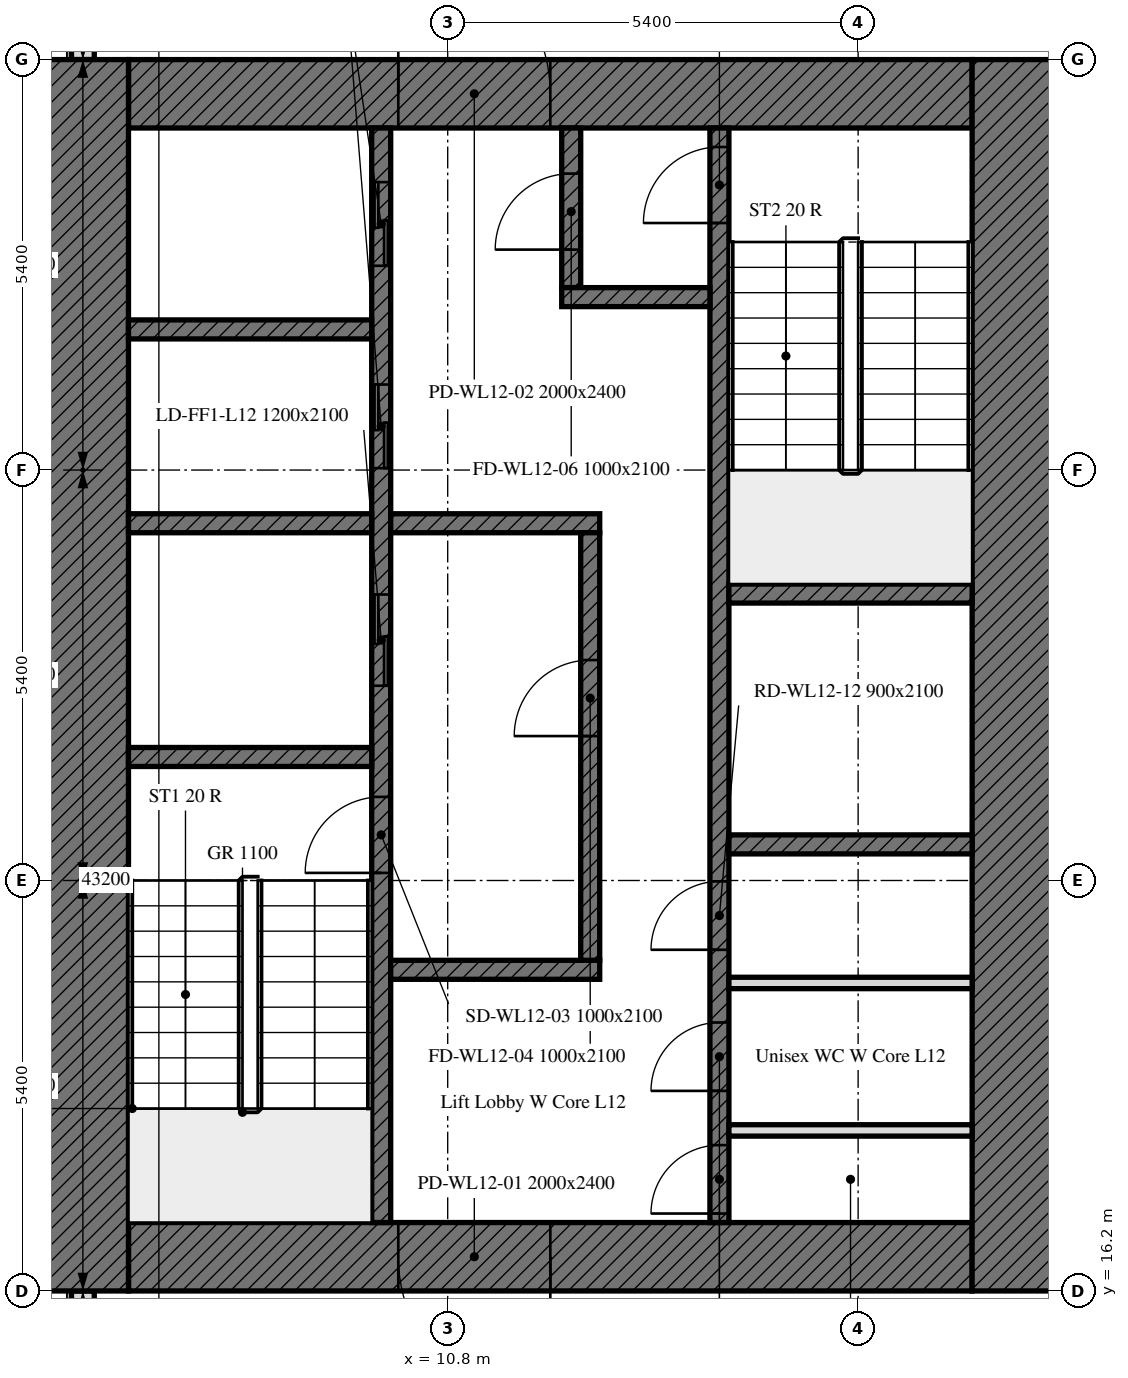
"""IFC4 building model, lengths in metres.
Left out: names, types, materials, properties, quantities, classifications, styles, units other than length and angle.
Written with IfcOpenShell. Run it as: python <this file> out.ifc"""

import sys

from ifc_helpers import new_model, si_unit, direction, frame, frame_2d, origin, place, context, subcontext, project, spatial, rectangle, extrude, element, fill, save


model = new_model("IFC4")
c1 = context("Model", 3, precision=1e-05, world=origin(), true_north=direction((0.0, 1.0)))
c2 = subcontext(c1, "Body", "Model", "MODEL_VIEW")
j1 = project(units=[si_unit("LENGTHUNIT", "METRE"), si_unit("PLANEANGLEUNIT", "RADIAN")], contexts=[c1])
p1 = place(None, origin())
s1 = spatial("IfcSite", under=j1, at=p1, CompositionType="ELEMENT")
p2 = place(p1, origin())
s2 = spatial("IfcBuilding", under=s1, at=p2, CompositionType="ELEMENT")
p3 = place(p2, frame((0.0, 0.0, 56.4)))
s3 = spatial("IfcBuildingStorey", under=s2, at=p3, CompositionType="ELEMENT", Elevation=56.4)
p4 = place(p3, frame((6.0, 37.614, 0.0), z_axis=(0.0, 0.0, 1.0), x_axis=(0.0, -1.0, 0.0)))
e1 = element("IfcWall", 1, at=p4, inside=s3, PredefinedType="SOLIDWALL", context=c2, shape_type="SweptSolid", body=[
    extrude(rectangle(XDim=5.214, YDim=0.3, at=frame_2d((2.607, 0.0))), origin(), (0.0, 0.0, 1.0), 3.3),
])
p5 = place(p4, frame((1.164, 0.0, 0.9)))
e2 = element("IfcOpeningElement", 2, at=p5, cuts=e1, PredefinedType="OPENING", context=c2, shape_type="SweptSolid", body=[
    extrude(rectangle(XDim=1.1, YDim=1.7, at=frame_2d((0.55, 0.85))), frame((0.0, 0.16, 0.0), z_axis=(0.0, -1.0, 0.0), x_axis=(1.0, 0.0, 0.0)), (0.0, 0.0, 1.0), 0.32),
])
p6 = place(p4, frame((2.764, 0.0, 0.9)))
e3 = element("IfcOpeningElement", 3, at=p6, cuts=e1, PredefinedType="OPENING", context=c2, shape_type="SweptSolid", body=[
    extrude(rectangle(XDim=1.1, YDim=1.7, at=frame_2d((0.55, 0.85))), frame((0.0, 0.16, 0.0), z_axis=(0.0, -1.0, 0.0), x_axis=(1.0, 0.0, 0.0)), (0.0, 0.0, 1.0), 0.32),
])
p7 = place(p3, frame((6.0, 16.2, 0.0), z_axis=(0.0, 0.0, 1.0), x_axis=(0.0, -1.0, 0.0)))
e4 = element("IfcWall", 4, at=p7, inside=s3, PredefinedType="SOLIDWALL", context=c2, shape_type="SweptSolid", body=[
    extrude(rectangle(XDim=10.614, YDim=0.3, at=frame_2d((5.307, 0.0))), origin(), (0.0, 0.0, 1.0), 3.3),
])
p8 = place(p7, frame((1.35, 0.0, 0.9)))
e5 = element("IfcOpeningElement", 5, at=p8, cuts=e4, PredefinedType="OPENING", context=c2, shape_type="SweptSolid", body=[
    extrude(rectangle(XDim=1.1, YDim=1.7, at=frame_2d((0.55, 0.85))), frame((0.0, 0.16, 0.0), z_axis=(0.0, -1.0, 0.0), x_axis=(1.0, 0.0, 0.0)), (0.0, 0.0, 1.0), 0.32),
])
p9 = place(p7, frame((2.95, 0.0, 0.9)))
e6 = element("IfcOpeningElement", 6, at=p9, cuts=e4, PredefinedType="OPENING", context=c2, shape_type="SweptSolid", body=[
    extrude(rectangle(XDim=1.1, YDim=1.7, at=frame_2d((0.55, 0.85))), frame((0.0, 0.16, 0.0), z_axis=(0.0, -1.0, 0.0), x_axis=(1.0, 0.0, 0.0)), (0.0, 0.0, 1.0), 0.32),
])
p10 = place(p3, frame((17.7, 16.65, 0.0), z_axis=(0.0, 0.0, 1.0), x_axis=(-1.0, 0.0, 0.0)))
e7 = element("IfcWall", 7, at=p10, inside=s3, PredefinedType="SOLIDWALL", context=c2, shape_type="SweptSolid", body=[
    extrude(rectangle(XDim=11.1, YDim=0.9, at=frame_2d((5.55, 0.0))), origin(), (0.0, 0.0, 1.0), 3.3),
])
p11 = place(p10, frame((5.55, 0.0, 0.0)))
e8 = element("IfcOpeningElement", 8, at=p11, cuts=e7, PredefinedType="OPENING", context=c2, shape_type="SweptSolid", body=[
    extrude(rectangle(XDim=2.0, YDim=2.4, at=frame_2d((1.0, 1.2))), frame((0.0, 0.45, 0.0), z_axis=(0.0, -1.0, 0.0), x_axis=(1.0, 0.0, 0.0)), (0.0, 0.0, 1.0), 0.9),
])
p12 = place(p3, frame((6.6, 31.95, 0.0), z_axis=(0.0, 0.0, 1.0), x_axis=(1.0, 0.0, 0.0)))
e9 = element("IfcWall", 9, at=p12, inside=s3, PredefinedType="SOLIDWALL", context=c2, shape_type="SweptSolid", body=[
    extrude(rectangle(XDim=11.1, YDim=0.9, at=frame_2d((5.55, 0.0))), origin(), (0.0, 0.0, 1.0), 3.3),
])
p13 = place(p12, frame((3.55, 0.0, 0.0)))
e10 = element("IfcOpeningElement", 10, at=p13, cuts=e9, PredefinedType="OPENING", context=c2, shape_type="SweptSolid", body=[
    extrude(rectangle(XDim=2.0, YDim=2.4, at=frame_2d((1.0, 1.2))), frame((0.0, 0.45, 0.0), z_axis=(0.0, -1.0, 0.0), x_axis=(1.0, 0.0, 0.0)), (0.0, 0.0, 1.0), 0.9),
])
for number, where, z_axis, x_axis in (
    (11, (6.0, 16.2, 0.0), (0.0, 0.0, 1.0), (0.0, 1.0, 0.0)),
    (12, (18.3, 32.4, 0.0), (0.0, 0.0, 1.0), (0.0, -1.0, 0.0)),
):
    element("IfcWall", number, at=place(p3, frame(where, z_axis=z_axis, x_axis=x_axis)), inside=s3, PredefinedType="SOLIDWALL", context=c2, shape_type="SweptSolid", body=[
        extrude(rectangle(XDim=16.2, YDim=1.2, at=frame_2d((8.1, 0.0))), origin(), (0.0, 0.0, 1.0), 3.3),
    ])
p14 = place(p3, frame((9.925, 17.1, 0.0), z_axis=(0.0, 0.0, 1.0), x_axis=(0.0, 1.0, 0.0)))
e13 = element("IfcWall", 13, at=p14, inside=s3, PredefinedType="SOLIDWALL", context=c2, shape_type="SweptSolid", body=[
    extrude(rectangle(XDim=14.4, YDim=0.25, at=frame_2d((7.2, 0.0))), origin(), (0.0, 0.0, 1.0), 3.3),
])
p15 = place(p14, frame((4.6, 0.0, 0.0)))
e14 = element("IfcOpeningElement", 14, at=p15, cuts=e13, PredefinedType="OPENING", context=c2, shape_type="SweptSolid", body=[
    extrude(rectangle(XDim=1.0, YDim=2.1, at=frame_2d((0.5, 1.05))), frame((0.0, 0.125, 0.0), z_axis=(0.0, -1.0, 0.0), x_axis=(1.0, 0.0, 0.0)), (0.0, 0.0, 1.0), 0.25),
])
p16 = place(p14, frame((7.062, 0.0, 0.0)))
e15 = element("IfcOpeningElement", 15, at=p16, cuts=e13, PredefinedType="OPENING", context=c2, shape_type="SweptSolid", body=[
    extrude(rectangle(XDim=1.2, YDim=2.1, at=frame_2d((0.6, 1.05))), frame((0.0, 0.125, 0.0), z_axis=(0.0, -1.0, 0.0), x_axis=(1.0, 0.0, 0.0)), (0.0, 0.0, 1.0), 0.25),
])
p17 = place(p14, frame((9.925, 0.0, 0.0)))
e16 = element("IfcOpeningElement", 16, at=p17, cuts=e13, PredefinedType="OPENING", context=c2, shape_type="SweptSolid", body=[
    extrude(rectangle(XDim=1.1, YDim=2.1, at=frame_2d((0.55, 1.05))), frame((0.0, 0.125, 0.0), z_axis=(0.0, -1.0, 0.0), x_axis=(1.0, 0.0, 0.0)), (0.0, 0.0, 1.0), 0.25),
])
p18 = place(p14, frame((12.587, 0.0, 0.0)))
e17 = element("IfcOpeningElement", 17, at=p18, cuts=e13, PredefinedType="OPENING", context=c2, shape_type="SweptSolid", body=[
    extrude(rectangle(XDim=1.1, YDim=2.1, at=frame_2d((0.55, 1.05))), frame((0.0, 0.125, 0.0), z_axis=(0.0, -1.0, 0.0), x_axis=(1.0, 0.0, 0.0)), (0.0, 0.0, 1.0), 0.25),
])
p19 = place(p3, frame((14.375, 17.1, 0.0), z_axis=(0.0, 0.0, 1.0), x_axis=(0.0, 1.0, 0.0)))
e18 = element("IfcWall", 18, at=p19, inside=s3, PredefinedType="SOLIDWALL", context=c2, shape_type="SweptSolid", body=[
    extrude(rectangle(XDim=14.4, YDim=0.25, at=frame_2d((7.2, 0.0))), origin(), (0.0, 0.0, 1.0), 3.3),
])
p20 = place(p19, frame((13.15, 0.0, 0.0)))
e19 = element("IfcOpeningElement", 19, at=p20, cuts=e18, PredefinedType="OPENING", context=c2, shape_type="SweptSolid", body=[
    extrude(rectangle(XDim=1.0, YDim=2.1, at=frame_2d((0.5, 1.05))), frame((0.0, 0.125, 0.0), z_axis=(0.0, -1.0, 0.0), x_axis=(1.0, 0.0, 0.0)), (0.0, 0.0, 1.0), 0.25),
])
p21 = place(p19, frame((0.118, 0.0, 0.0)))
e20 = element("IfcOpeningElement", 20, at=p21, cuts=e18, PredefinedType="OPENING", context=c2, shape_type="SweptSolid", body=[
    extrude(rectangle(XDim=0.9, YDim=2.1, at=frame_2d((0.45, 1.05))), frame((0.0, 0.125, 0.0), z_axis=(0.0, -1.0, 0.0), x_axis=(1.0, 0.0, 0.0)), (0.0, 0.0, 1.0), 0.25),
])
p22 = place(p19, frame((1.732, 0.0, 0.0)))
e21 = element("IfcOpeningElement", 21, at=p22, cuts=e18, PredefinedType="OPENING", context=c2, shape_type="SweptSolid", body=[
    extrude(rectangle(XDim=0.9, YDim=2.1, at=frame_2d((0.45, 1.05))), frame((0.0, 0.125, 0.0), z_axis=(0.0, -1.0, 0.0), x_axis=(1.0, 0.0, 0.0)), (0.0, 0.0, 1.0), 0.25),
])
p23 = place(p19, frame((3.588, 0.0, 0.0)))
e22 = element("IfcOpeningElement", 22, at=p23, cuts=e18, PredefinedType="OPENING", context=c2, shape_type="SweptSolid", body=[
    extrude(rectangle(XDim=0.9, YDim=2.1, at=frame_2d((0.45, 1.05))), frame((0.0, 0.125, 0.0), z_axis=(0.0, -1.0, 0.0), x_axis=(1.0, 0.0, 0.0)), (0.0, 0.0, 1.0), 0.25),
])
for number, where, z_axis, x_axis in (
    (23, (6.6, 23.225, 0.0), (0.0, 0.0, 1.0), (1.0, 0.0, 0.0)),
    (24, (14.5, 25.375, 0.0), (0.0, 0.0, 1.0), (1.0, 0.0, 0.0)),
    (25, (14.5, 22.075, 0.0), (0.0, 0.0, 1.0), (1.0, 0.0, 0.0)),
    (26, (6.6, 26.3, 0.0), (0.0, 0.0, 1.0), (1.0, 0.0, 0.0)),
):
    element("IfcWall", number, at=place(p3, frame(where, z_axis=z_axis, x_axis=x_axis)), inside=s3, PredefinedType="SOLIDWALL", context=c2, shape_type="SweptSolid", body=[
        extrude(rectangle(XDim=3.2, YDim=0.25, at=frame_2d((1.6, 0.0))), origin(), (0.0, 0.0, 1.0), 3.3),
    ])
for number, where, z_axis, x_axis in (
    (27, (10.05, 26.3, 0.0), (0.0, 0.0, 1.0), (1.0, 0.0, 0.0)),
    (28, (10.05, 20.425, 0.0), (0.0, 0.0, 1.0), (1.0, 0.0, 0.0)),
):
    element("IfcWall", number, at=place(p3, frame(where, z_axis=z_axis, x_axis=x_axis)), inside=s3, PredefinedType="SOLIDWALL", context=c2, shape_type="SweptSolid", body=[
        extrude(rectangle(XDim=2.75, YDim=0.25, at=frame_2d((1.375, 0.0))), origin(), (0.0, 0.0, 1.0), 3.3),
    ])
p24 = place(p3, frame((12.425, 29.4, 0.0), z_axis=(0.0, 0.0, 1.0), x_axis=(0.0, 1.0, 0.0)))
e29 = element("IfcWall", 29, at=p24, inside=s3, PredefinedType="SOLIDWALL", context=c2, shape_type="SweptSolid", body=[
    extrude(rectangle(XDim=2.1, YDim=0.25, at=frame_2d((1.05, 0.0))), origin(), (0.0, 0.0, 1.0), 3.3),
])
p25 = place(p24, frame((0.5, 0.0, 0.0)))
e30 = element("IfcOpeningElement", 30, at=p25, cuts=e29, PredefinedType="OPENING", context=c2, shape_type="SweptSolid", body=[
    extrude(rectangle(XDim=1.0, YDim=2.1, at=frame_2d((0.5, 1.05))), frame((0.0, 0.125, 0.0), z_axis=(0.0, -1.0, 0.0), x_axis=(1.0, 0.0, 0.0)), (0.0, 0.0, 1.0), 0.25),
])
p26 = place(p3, frame((12.3, 29.275, 0.0), z_axis=(0.0, 0.0, 1.0), x_axis=(1.0, 0.0, 0.0)))
e31 = element("IfcWall", 31, at=p26, inside=s3, PredefinedType="SOLIDWALL", context=c2, shape_type="SweptSolid", body=[
    extrude(rectangle(XDim=1.95, YDim=0.25, at=frame_2d((0.975, 0.0))), origin(), (0.0, 0.0, 1.0), 3.3),
])
p27 = place(p3, frame((12.675, 20.55, 0.0), z_axis=(0.0, 0.0, 1.0), x_axis=(0.0, 1.0, 0.0)))
e32 = element("IfcWall", 32, at=p27, inside=s3, PredefinedType="SOLIDWALL", context=c2, shape_type="SweptSolid", body=[
    extrude(rectangle(XDim=5.625, YDim=0.25, at=frame_2d((2.812, 0.0))), origin(), (0.0, 0.0, 1.0), 3.3),
])
p28 = place(p27, frame((2.95, 0.0, 0.0)))
e33 = element("IfcOpeningElement", 33, at=p28, cuts=e32, PredefinedType="OPENING", context=c2, shape_type="SweptSolid", body=[
    extrude(rectangle(XDim=1.0, YDim=2.1, at=frame_2d((0.5, 1.05))), frame((0.0, 0.125, 0.0), z_axis=(0.0, -1.0, 0.0), x_axis=(1.0, 0.0, 0.0)), (0.0, 0.0, 1.0), 0.25),
])
p29 = place(p3, frame((6.6, 28.85, 0.0), z_axis=(0.0, 0.0, 1.0), x_axis=(1.0, 0.0, 0.0)))
e34 = element("IfcWall", 34, at=p29, inside=s3, PredefinedType="SOLIDWALL", context=c2, shape_type="SweptSolid", body=[
    extrude(rectangle(XDim=3.2, YDim=0.25, at=frame_2d((1.6, 0.0))), origin(), (0.0, 0.0, 1.0), 3.3),
])
for number, where, z_axis, x_axis in (
    (35, (14.5, 18.312, 0.0), (0.0, 0.0, 1.0), (1.0, 0.0, 0.0)),
    (36, (14.5, 20.252, 0.0), (0.0, 0.0, 1.0), (1.0, 0.0, 0.0)),
):
    element("IfcWall", number, at=place(p3, frame(where, z_axis=z_axis, x_axis=x_axis)), inside=s3, PredefinedType="PARTITIONING", context=c2, shape_type="SweptSolid", body=[
        extrude(rectangle(XDim=3.2, YDim=0.15, at=frame_2d((1.6, 0.0))), origin(), (0.0, 0.0, 1.0), 3.3),
    ])
p30 = place(p11, origin())
e37 = element("IfcDoor", 37, at=p30, inside=s3, OperationType="DOUBLE_DOOR_SINGLE_SWING", PredefinedType="DOOR", context=c2, shape_type="SweptSolid", body=[
    extrude(rectangle(XDim=2.0, YDim=2.4, at=frame_2d((1.0, 1.2))), frame((0.0, 0.025, 0.0), z_axis=(0.0, -1.0, 0.0), x_axis=(1.0, 0.0, 0.0)), (0.0, 0.0, 1.0), 0.05),
])
fill(e8, e37)
p31 = place(p13, origin())
e38 = element("IfcDoor", 38, at=p31, inside=s3, OperationType="DOUBLE_DOOR_SINGLE_SWING", PredefinedType="DOOR", context=c2, shape_type="SweptSolid", body=[
    extrude(rectangle(XDim=2.0, YDim=2.4, at=frame_2d((1.0, 1.2))), frame((0.0, 0.025, 0.0), z_axis=(0.0, -1.0, 0.0), x_axis=(1.0, 0.0, 0.0)), (0.0, 0.0, 1.0), 0.05),
])
fill(e10, e38)
p32 = place(p15, origin())
e39 = element("IfcDoor", 39, at=p32, inside=s3, OperationType="SINGLE_SWING_LEFT", PredefinedType="DOOR", context=c2, shape_type="SweptSolid", body=[
    extrude(rectangle(XDim=1.0, YDim=2.1, at=frame_2d((0.5, 1.05))), frame((0.0, 0.025, 0.0), z_axis=(0.0, -1.0, 0.0), x_axis=(1.0, 0.0, 0.0)), (0.0, 0.0, 1.0), 0.05),
])
fill(e14, e39)
p33 = place(p28, origin())
e40 = element("IfcDoor", 40, at=p33, inside=s3, OperationType="SINGLE_SWING_LEFT", PredefinedType="DOOR", context=c2, shape_type="SweptSolid", body=[
    extrude(rectangle(XDim=1.0, YDim=2.1, at=frame_2d((0.5, 1.05))), frame((0.0, 0.025, 0.0), z_axis=(0.0, -1.0, 0.0), x_axis=(1.0, 0.0, 0.0)), (0.0, 0.0, 1.0), 0.05),
])
fill(e33, e40)
p34 = place(p20, origin())
e41 = element("IfcDoor", 41, at=p34, inside=s3, OperationType="SINGLE_SWING_LEFT", PredefinedType="DOOR", context=c2, shape_type="SweptSolid", body=[
    extrude(rectangle(XDim=1.0, YDim=2.1, at=frame_2d((0.5, 1.05))), frame((0.0, 0.025, 0.0), z_axis=(0.0, -1.0, 0.0), x_axis=(1.0, 0.0, 0.0)), (0.0, 0.0, 1.0), 0.05),
])
fill(e19, e41)
p35 = place(p25, origin())
e42 = element("IfcDoor", 42, at=p35, inside=s3, OperationType="SINGLE_SWING_LEFT", PredefinedType="DOOR", context=c2, shape_type="SweptSolid", body=[
    extrude(rectangle(XDim=1.0, YDim=2.1, at=frame_2d((0.5, 1.05))), frame((0.0, 0.025, 0.0), z_axis=(0.0, -1.0, 0.0), x_axis=(1.0, 0.0, 0.0)), (0.0, 0.0, 1.0), 0.05),
])
fill(e30, e42)
p36 = place(p16, origin())
e43 = element("IfcDoor", 43, at=p36, inside=s3, OperationType="DOUBLE_DOOR_SLIDING", PredefinedType="DOOR", context=c2, shape_type="SweptSolid", body=[
    extrude(rectangle(XDim=1.2, YDim=2.1, at=frame_2d((0.6, 1.05))), frame((0.0, 0.025, 0.0), z_axis=(0.0, -1.0, 0.0), x_axis=(1.0, 0.0, 0.0)), (0.0, 0.0, 1.0), 0.05),
])
fill(e15, e43)
p37 = place(p17, origin())
e44 = element("IfcDoor", 44, at=p37, inside=s3, OperationType="DOUBLE_DOOR_SLIDING", PredefinedType="DOOR", context=c2, shape_type="SweptSolid", body=[
    extrude(rectangle(XDim=1.1, YDim=2.1, at=frame_2d((0.55, 1.05))), frame((0.0, 0.025, 0.0), z_axis=(0.0, -1.0, 0.0), x_axis=(1.0, 0.0, 0.0)), (0.0, 0.0, 1.0), 0.05),
])
fill(e16, e44)
p38 = place(p18, origin())
e45 = element("IfcDoor", 45, at=p38, inside=s3, OperationType="DOUBLE_DOOR_SLIDING", PredefinedType="DOOR", context=c2, shape_type="SweptSolid", body=[
    extrude(rectangle(XDim=1.1, YDim=2.1, at=frame_2d((0.55, 1.05))), frame((0.0, 0.025, 0.0), z_axis=(0.0, -1.0, 0.0), x_axis=(1.0, 0.0, 0.0)), (0.0, 0.0, 1.0), 0.05),
])
fill(e17, e45)
p39 = place(p21, origin())
e46 = element("IfcDoor", 46, at=p39, inside=s3, OperationType="SINGLE_SWING_LEFT", PredefinedType="DOOR", context=c2, shape_type="SweptSolid", body=[
    extrude(rectangle(XDim=0.9, YDim=2.1, at=frame_2d((0.45, 1.05))), frame((0.0, 0.025, 0.0), z_axis=(0.0, -1.0, 0.0), x_axis=(1.0, 0.0, 0.0)), (0.0, 0.0, 1.0), 0.05),
])
fill(e20, e46)
p40 = place(p22, origin())
e47 = element("IfcDoor", 47, at=p40, inside=s3, OperationType="SINGLE_SWING_LEFT", PredefinedType="DOOR", context=c2, shape_type="SweptSolid", body=[
    extrude(rectangle(XDim=0.9, YDim=2.1, at=frame_2d((0.45, 1.05))), frame((0.0, 0.025, 0.0), z_axis=(0.0, -1.0, 0.0), x_axis=(1.0, 0.0, 0.0)), (0.0, 0.0, 1.0), 0.05),
])
fill(e21, e47)
p41 = place(p23, origin())
e48 = element("IfcDoor", 48, at=p41, inside=s3, OperationType="SINGLE_SWING_LEFT", PredefinedType="DOOR", context=c2, shape_type="SweptSolid", body=[
    extrude(rectangle(XDim=0.9, YDim=2.1, at=frame_2d((0.45, 1.05))), frame((0.0, 0.025, 0.0), z_axis=(0.0, -1.0, 0.0), x_axis=(1.0, 0.0, 0.0)), (0.0, 0.0, 1.0), 0.05),
])
fill(e22, e48)
save(model, sys.argv[1])
